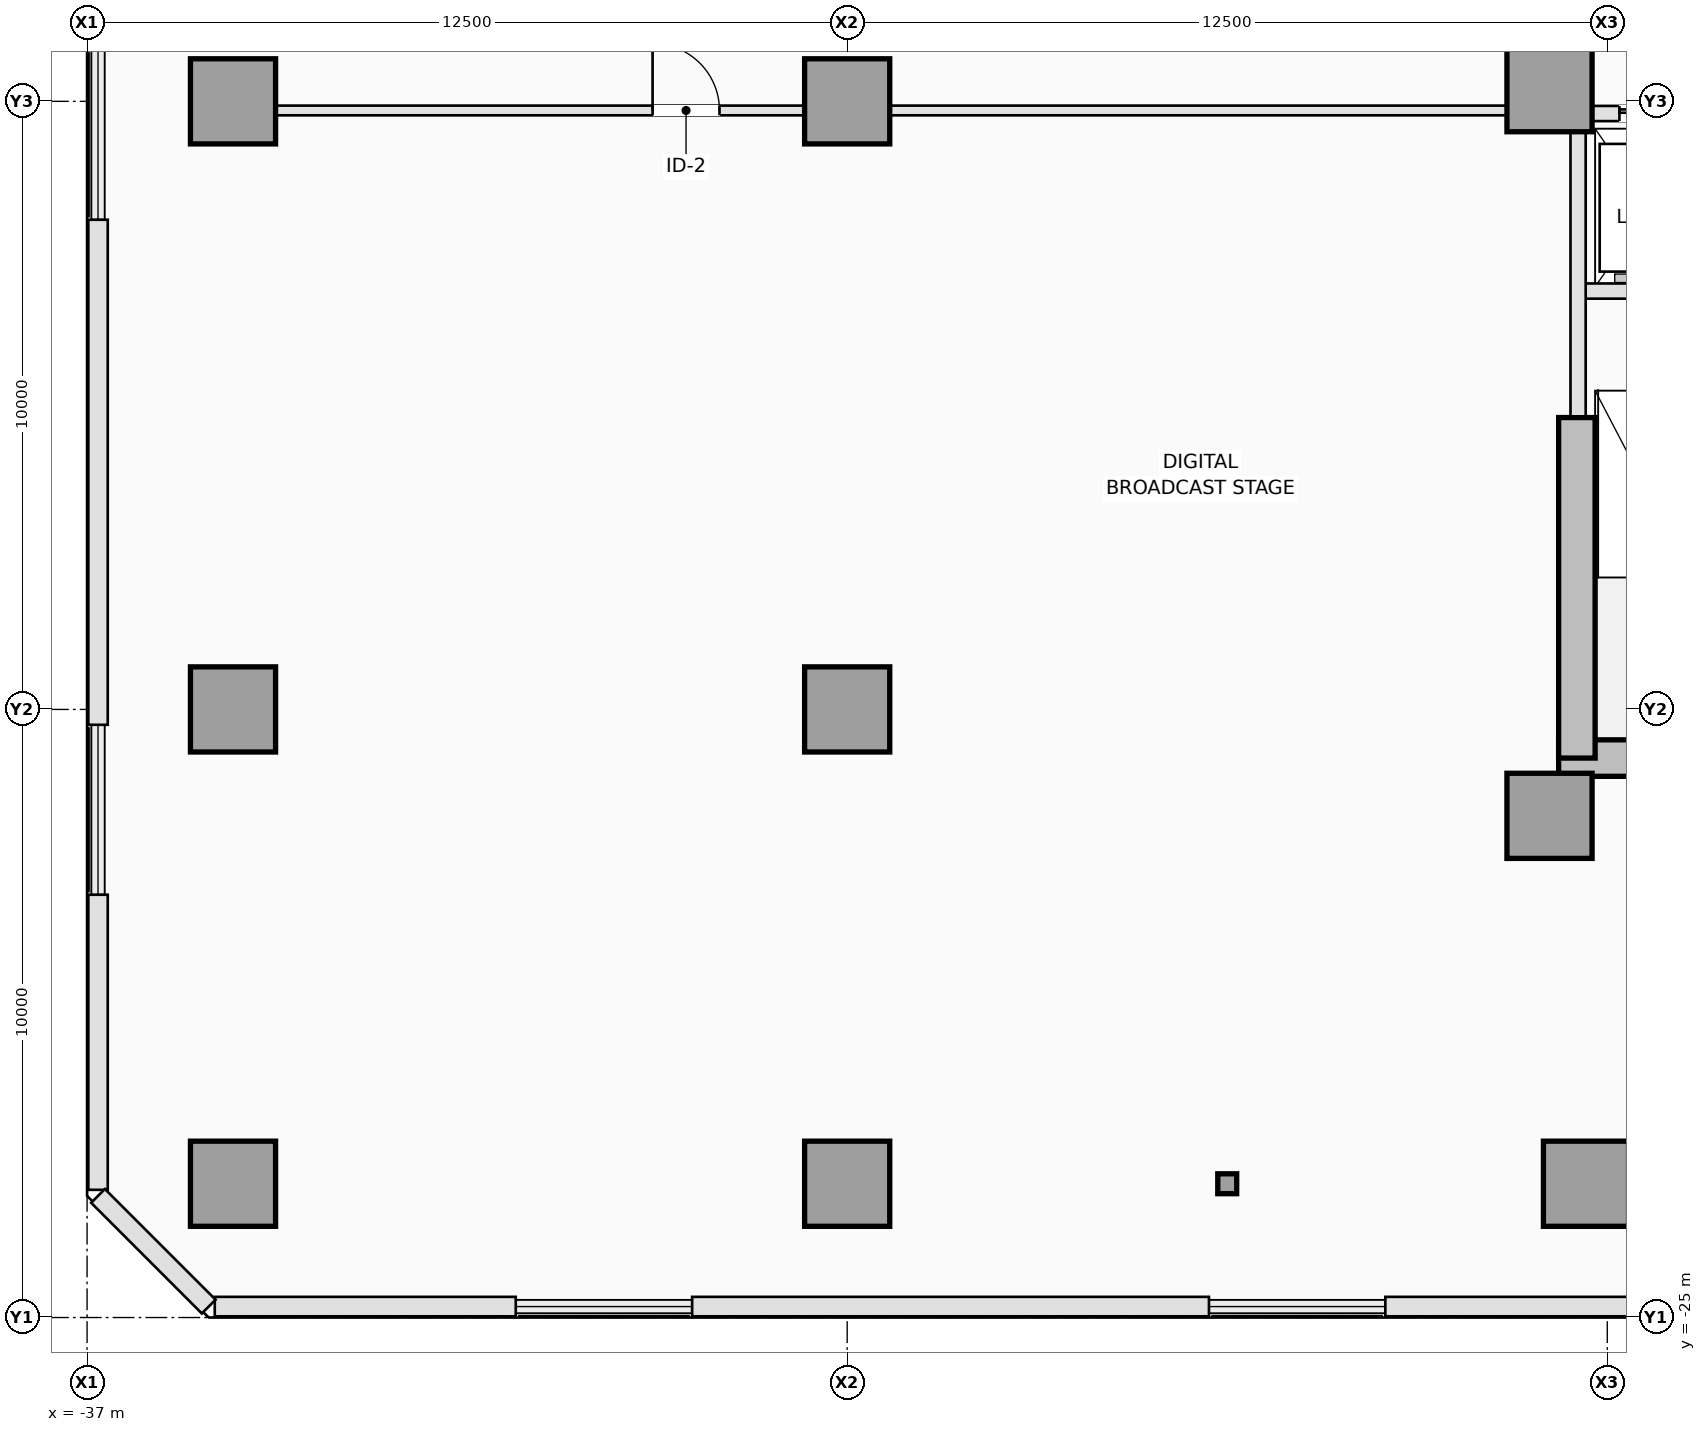
"""IFC4 building model, lengths in metres.
Left out: names, types, materials, properties, quantities, classifications, styles, units other than length and angle.
Written with IfcOpenShell. Run it as: python <this file> out.ifc"""

import sys

from ifc_helpers import new_model, si_unit, direction, frame, frame_2d, origin, origin_2d, place, context, subcontext, project, spatial, rectangle, i_section, extrude, element, fill, save


model = new_model("IFC4")
c1 = context("Model", 3, precision=1e-05, world=origin(), true_north=direction((0.0, 1.0)))
c2 = subcontext(c1, "Body", "Model", "MODEL_VIEW")
j1 = project(units=[si_unit("LENGTHUNIT", "METRE"), si_unit("PLANEANGLEUNIT", "RADIAN")], contexts=[c1])
p1 = place(None, origin())
s1 = spatial("IfcSite", under=j1, at=p1, CompositionType="ELEMENT")
p2 = place(p1, origin())
s2 = spatial("IfcBuilding", under=s1, at=p2, CompositionType="ELEMENT")
p3 = place(p2, frame((0.0, 0.0, 14.0)))
s3 = spatial("IfcBuildingStorey", under=s2, at=p3, CompositionType="ELEMENT", Elevation=14.0)
p4 = place(p3, frame((-12.8, -15.8, 0.0), z_axis=(0.0, 0.0, 1.0), x_axis=(1.0, 0.0, 0.0)))
e1 = element("IfcWall", 1, at=p4, inside=s3, PredefinedType="SHEAR", context=c2, shape_type="SweptSolid", body=[
    extrude(rectangle(XDim=4.2, YDim=0.6, at=frame_2d((2.1, 0.0))), origin(), (0.0, 0.0, 1.0), 4.5),
])
p5 = place(p3, frame((-12.5, -15.8, 0.0), z_axis=(0.0, 0.0, 1.0), x_axis=(0.0, 1.0, 0.0)))
e2 = element("IfcWall", 2, at=p5, inside=s3, PredefinedType="SHEAR", context=c2, shape_type="SweptSolid", body=[
    extrude(rectangle(XDim=5.6, YDim=0.6, at=frame_2d((2.8, 0.0))), origin(), (0.0, 0.0, 1.0), 4.5),
])
for number, where, z_axis, x_axis in (
    (3, (-12.95, -16.75, 0.0), (0.0, 0.0, 1.0), (1.0, 0.0, 0.0)),
    (4, (-12.95, -4.8, 0.0), (0.0, 0.0, 1.0), (1.0, 0.0, 0.0)),
    (5, (-34.6, -22.8, 0.0), (0.0, 0.0, 1.0), (1.0, 0.0, 0.0)),
    (6, (-24.5, -22.8, 0.0), (0.0, 0.0, 1.0), (1.0, 0.0, 0.0)),
    (7, (-12.35, -22.8, 0.0), (0.0, 0.0, 1.0), (1.0, 0.0, 0.0)),
    (8, (-34.6, -15.0, 0.0), (0.0, 0.0, 1.0), (1.0, 0.0, 0.0)),
    (9, (-24.5, -15.0, 0.0), (0.0, 0.0, 1.0), (1.0, 0.0, 0.0)),
    (10, (-34.6, -5.0, 0.0), (0.0, 0.0, 1.0), (1.0, 0.0, 0.0)),
    (11, (-24.5, -5.0, 0.0), (0.0, 0.0, 1.0), (1.0, 0.0, 0.0)),
):
    element("IfcColumn", number, at=place(p3, frame(where, z_axis=z_axis, x_axis=x_axis)), inside=s3, PredefinedType="COLUMN", context=c2, shape_type="SweptSolid", body=[
        extrude(rectangle(XDim=1.4, YDim=1.4, at=origin_2d()), origin(), (0.0, 0.0, 1.0), 4.5),
    ])
p6 = place(p3, frame((-18.25, -22.8, 0.0), z_axis=(0.0, 0.0, 1.0), x_axis=(1.0, 0.0, 0.0)))
e12 = element("IfcColumn", 12, at=p6, inside=s3, PredefinedType="COLUMN", context=c2, shape_type="SweptSolid", body=[
    extrude(i_section(OverallWidth=0.311, OverallDepth=0.327, WebThickness=0.016, FlangeThickness=0.025, FilletRadius=0.017, at=origin_2d()), origin(), (0.0, 0.0, 1.0), 4.5),
])
for number, where, z_axis, x_axis in (
    (13, (-7.15, -24.82, 0.0), (0.0, 0.0, 1.0), (-1.0, 0.0, 0.0)),
    (14, (-18.551, -24.82, 0.0), (0.0, 0.0, 1.0), (-1.0, 0.0, 0.0)),
):
    element("IfcWall", number, at=place(p3, frame(where, z_axis=z_axis, x_axis=x_axis)), inside=s3, PredefinedType="STANDARD", context=c2, shape_type="SweptSolid", body=[
        extrude(rectangle(XDim=8.499, YDim=0.32, at=frame_2d((4.25, 0.0))), origin(), (0.0, 0.0, 1.0), 4.2),
    ])
p7 = place(p3, frame((-29.95, -24.82, 0.0), z_axis=(0.0, 0.0, 1.0), x_axis=(-1.0, 0.0, 0.0)))
e15 = element("IfcWall", 15, at=p7, inside=s3, PredefinedType="STANDARD", context=c2, shape_type="SweptSolid", body=[
    extrude(rectangle(XDim=4.949, YDim=0.32, at=frame_2d((2.475, 0.0))), origin(), (0.0, 0.0, 1.0), 4.2),
])
p8 = place(p3, frame((-36.82, -22.9, 0.0), z_axis=(0.0, 0.0, 1.0), x_axis=(0.0, 1.0, 0.0)))
e16 = element("IfcWall", 16, at=p8, inside=s3, PredefinedType="STANDARD", context=c2, shape_type="SweptSolid", body=[
    extrude(rectangle(XDim=4.853, YDim=0.32, at=frame_2d((2.426, 0.0))), origin(), (0.0, 0.0, 1.0), 4.2),
])
p9 = place(p3, frame((-36.82, -15.253, 0.0), z_axis=(0.0, 0.0, 1.0), x_axis=(0.0, 1.0, 0.0)))
e17 = element("IfcWall", 17, at=p9, inside=s3, PredefinedType="STANDARD", context=c2, shape_type="SweptSolid", body=[
    extrude(rectangle(XDim=8.305, YDim=0.32, at=frame_2d((4.153, 0.0))), origin(), (0.0, 0.0, 1.0), 4.2),
])
p10 = place(p3, frame((-35.0, -24.82, 0.0), z_axis=(0.0, 0.0, 1.0), x_axis=(-0.707106781187, 0.707106781187, 0.0)))
e18 = element("IfcWall", 18, at=p10, inside=s3, PredefinedType="STANDARD", context=c2, shape_type="SweptSolid", body=[
    extrude(rectangle(XDim=2.574, YDim=0.32, at=frame_2d((1.287, 0.0))), origin(), (0.0, 0.0, 1.0), 4.2),
])
p11 = place(p3, frame((-12.38, -8.12, 0.0), z_axis=(0.0, 0.0, 1.0), x_axis=(1.0, 0.0, 0.0)))
e19 = element("IfcWall", 19, at=p11, inside=s3, PredefinedType="PARTITIONING", context=c2, shape_type="SweptSolid", body=[
    extrude(rectangle(XDim=3.22, YDim=0.25, at=frame_2d((1.61, 0.0))), origin(), (0.0, 0.0, 1.0), 4.2),
])
p12 = place(p3, frame((-12.48, -10.18, 0.0), z_axis=(0.0, 0.0, 1.0), x_axis=(0.0, 1.0, 0.0)))
e20 = element("IfcWall", 20, at=p12, inside=s3, PredefinedType="PARTITIONING", context=c2, shape_type="SweptSolid", body=[
    extrude(rectangle(XDim=4.678, YDim=0.25, at=frame_2d((2.339, 0.0))), origin(), (0.0, 0.0, 1.0), 4.2),
])
p13 = place(p3, frame((-12.248, -5.2, 0.0), z_axis=(0.0, 0.0, 1.0), x_axis=(1.0, 0.0, 0.0)))
e21 = element("IfcWall", 21, at=p13, inside=s3, PredefinedType="PARTITIONING", context=c2, shape_type="SweptSolid", body=[
    extrude(rectangle(XDim=7.796, YDim=0.25, at=frame_2d((3.898, 0.0))), origin(), (0.0, 0.0, 1.0), 4.2),
])
p14 = place(p13, frame((0.448, 0.0, 0.0)))
e22 = element("IfcOpeningElement", 22, at=p14, cuts=e21, PredefinedType="OPENING", context=c2, shape_type="SweptSolid", body=[
    extrude(rectangle(XDim=1.0, YDim=2.15, at=frame_2d((0.5, 1.075))), frame((0.0, 0.135, 0.0), z_axis=(0.0, -1.0, 0.0), x_axis=(1.0, 0.0, 0.0)), (0.0, 0.0, 1.0), 0.27),
])
p15 = place(p13, frame((2.398, 0.0, 0.0)))
e23 = element("IfcOpeningElement", 23, at=p15, cuts=e21, PredefinedType="OPENING", context=c2, shape_type="SweptSolid", body=[
    extrude(rectangle(XDim=1.0, YDim=2.15, at=frame_2d((0.5, 1.075))), frame((0.0, 0.135, 0.0), z_axis=(0.0, -1.0, 0.0), x_axis=(1.0, 0.0, 0.0)), (0.0, 0.0, 1.0), 0.27),
])
p16 = place(p13, frame((4.348, 0.0, 0.0)))
e24 = element("IfcOpeningElement", 24, at=p16, cuts=e21, PredefinedType="OPENING", context=c2, shape_type="SweptSolid", body=[
    extrude(rectangle(XDim=1.0, YDim=2.15, at=frame_2d((0.5, 1.075))), frame((0.0, 0.135, 0.0), z_axis=(0.0, -1.0, 0.0), x_axis=(1.0, 0.0, 0.0)), (0.0, 0.0, 1.0), 0.27),
])
p17 = place(p13, frame((6.298, 0.0, 0.0)))
e25 = element("IfcOpeningElement", 25, at=p17, cuts=e21, PredefinedType="OPENING", context=c2, shape_type="SweptSolid", body=[
    extrude(rectangle(XDim=1.0, YDim=2.15, at=frame_2d((0.5, 1.075))), frame((0.0, 0.135, 0.0), z_axis=(0.0, -1.0, 0.0), x_axis=(1.0, 0.0, 0.0)), (0.0, 0.0, 1.0), 0.27),
])
p18 = place(p3, frame((-33.898, -5.15, 0.0), z_axis=(0.0, 0.0, 1.0), x_axis=(1.0, 0.0, 0.0)))
e26 = element("IfcWall", 26, at=p18, inside=s3, PredefinedType="PARTITIONING", context=c2, shape_type="SweptSolid", body=[
    extrude(rectangle(XDim=8.696, YDim=0.16, at=frame_2d((4.348, 0.0))), origin(), (0.0, 0.0, 1.0), 3.176),
])
p19 = place(p18, frame((6.198, 0.0, 0.0)))
e27 = element("IfcOpeningElement", 27, at=p19, cuts=e26, PredefinedType="OPENING", context=c2, shape_type="SweptSolid", body=[
    extrude(rectangle(XDim=1.1, YDim=2.15, at=frame_2d((0.55, 1.075))), frame((0.0, 0.09, 0.0), z_axis=(0.0, -1.0, 0.0), x_axis=(1.0, 0.0, 0.0)), (0.0, 0.0, 1.0), 0.18),
])
p20 = place(p3, frame((-23.798, -5.15, 0.0), z_axis=(0.0, 0.0, 1.0), x_axis=(1.0, 0.0, 0.0)))
e28 = element("IfcWall", 28, at=p20, inside=s3, PredefinedType="PARTITIONING", context=c2, shape_type="SweptSolid", body=[
    extrude(rectangle(XDim=10.146, YDim=0.16, at=frame_2d((5.073, 0.0))), origin(), (0.0, 0.0, 1.0), 3.176),
])
p21 = place(p14, origin())
e29 = element("IfcDoor", 29, at=p21, inside=s3, OperationType="SLIDING_TO_LEFT", PredefinedType="DOOR", context=c2, shape_type="SweptSolid", body=[
    extrude(rectangle(XDim=1.0, YDim=2.15, at=frame_2d((0.5, 1.075))), frame((0.0, 0.025, 0.0), z_axis=(0.0, -1.0, 0.0), x_axis=(1.0, 0.0, 0.0)), (0.0, 0.0, 1.0), 0.05),
])
fill(e22, e29)
p22 = place(p19, origin())
e30 = element("IfcDoor", 30, at=p22, inside=s3, OperationType="SINGLE_SWING_LEFT", PredefinedType="DOOR", context=c2, shape_type="SweptSolid", body=[
    extrude(rectangle(XDim=1.1, YDim=2.15, at=frame_2d((0.55, 1.075))), frame((0.0, 0.025, 0.0), z_axis=(0.0, -1.0, 0.0), x_axis=(1.0, 0.0, 0.0)), (0.0, 0.0, 1.0), 0.05),
])
fill(e27, e30)
save(model, sys.argv[1])
